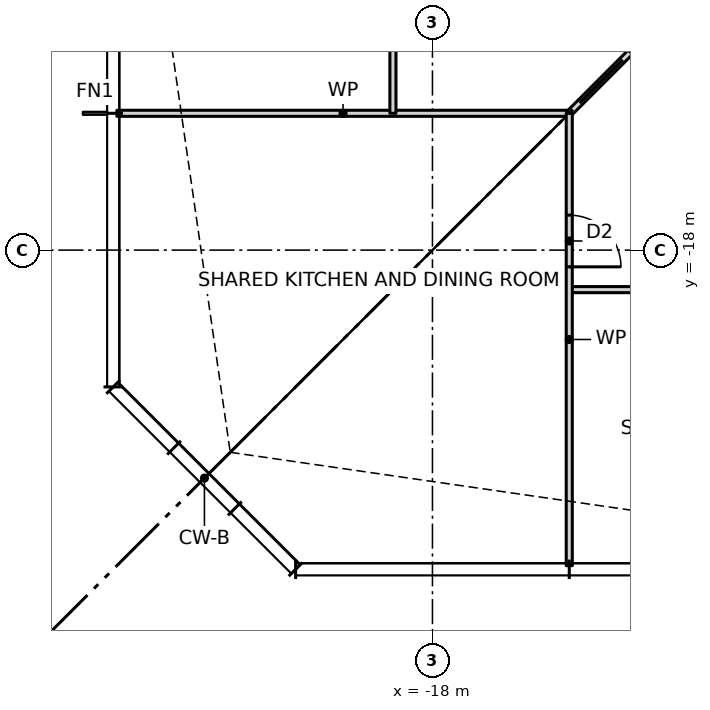
"""IFC4 building model, lengths in metres.
Left out: names, types, materials, properties, quantities, classifications, styles, units other than length and angle.
Written with IfcOpenShell. Run it as: python <this file> out.ifc"""

import sys

from ifc_helpers import new_model, si_unit, direction, frame, frame_2d, origin, place, context, subcontext, project, spatial, rectangle, extrude, element, fill, save


model = new_model("IFC4")
c1 = context("Model", 3, precision=1e-05, world=origin(), true_north=direction((0.0, 1.0)))
c2 = subcontext(c1, "Body", "Model", "MODEL_VIEW")
j1 = project(units=[si_unit("LENGTHUNIT", "METRE"), si_unit("PLANEANGLEUNIT", "RADIAN")], contexts=[c1])
p1 = place(None, origin())
s1 = spatial("IfcSite", under=j1, at=p1, CompositionType="ELEMENT")
p2 = place(p1, origin())
s2 = spatial("IfcBuilding", under=s1, at=p2, CompositionType="ELEMENT")
p3 = place(p2, frame((0.0, 0.0, 71.0)))
s3 = spatial("IfcBuildingStorey", under=s2, at=p3, CompositionType="ELEMENT", Elevation=71.0)
p4 = place(p3, frame((-15.75, -18.65, 0.0), z_axis=(0.0, 0.0, 1.0), x_axis=(1.0, 0.0, 0.0)))
e1 = element("IfcWall", 1, at=p4, inside=s3, PredefinedType="PARTITIONING", context=c2, shape_type="SweptSolid", body=[
    extrude(rectangle(XDim=31.5, YDim=0.1, at=frame_2d((15.75, 0.0))), origin(), (0.0, 0.0, 1.0), 3.2),
])
p5 = place(p4, frame((1.8, 0.0, 0.0)))
e2 = element("IfcOpeningElement", 2, at=p5, cuts=e1, PredefinedType="OPENING", context=c2, shape_type="SweptSolid", body=[
    extrude(rectangle(XDim=0.9, YDim=2.1, at=frame_2d((0.45, 1.05))), frame((0.0, 0.06, 0.0), z_axis=(0.0, -1.0, 0.0), x_axis=(1.0, 0.0, 0.0)), (0.0, 0.0, 1.0), 0.12),
])
p6 = place(p4, frame((6.3, 0.0, 0.0)))
e3 = element("IfcOpeningElement", 3, at=p6, cuts=e1, PredefinedType="OPENING", context=c2, shape_type="SweptSolid", body=[
    extrude(rectangle(XDim=0.9, YDim=2.1, at=frame_2d((0.45, 1.05))), frame((0.0, 0.06, 0.0), z_axis=(0.0, -1.0, 0.0), x_axis=(1.0, 0.0, 0.0)), (0.0, 0.0, 1.0), 0.12),
])
p7 = place(p4, frame((10.8, 0.0, 0.0)))
e4 = element("IfcOpeningElement", 4, at=p7, cuts=e1, PredefinedType="OPENING", context=c2, shape_type="SweptSolid", body=[
    extrude(rectangle(XDim=0.9, YDim=2.1, at=frame_2d((0.45, 1.05))), frame((0.0, 0.06, 0.0), z_axis=(0.0, -1.0, 0.0), x_axis=(1.0, 0.0, 0.0)), (0.0, 0.0, 1.0), 0.12),
])
p8 = place(p4, frame((15.3, 0.0, 0.0)))
e5 = element("IfcOpeningElement", 5, at=p8, cuts=e1, PredefinedType="OPENING", context=c2, shape_type="SweptSolid", body=[
    extrude(rectangle(XDim=0.9, YDim=2.1, at=frame_2d((0.45, 1.05))), frame((0.0, 0.06, 0.0), z_axis=(0.0, -1.0, 0.0), x_axis=(1.0, 0.0, 0.0)), (0.0, 0.0, 1.0), 0.12),
])
p9 = place(p4, frame((19.8, 0.0, 0.0)))
e6 = element("IfcOpeningElement", 6, at=p9, cuts=e1, PredefinedType="OPENING", context=c2, shape_type="SweptSolid", body=[
    extrude(rectangle(XDim=0.9, YDim=2.1, at=frame_2d((0.45, 1.05))), frame((0.0, 0.06, 0.0), z_axis=(0.0, -1.0, 0.0), x_axis=(1.0, 0.0, 0.0)), (0.0, 0.0, 1.0), 0.12),
])
p10 = place(p4, frame((24.3, 0.0, 0.0)))
e7 = element("IfcOpeningElement", 7, at=p10, cuts=e1, PredefinedType="OPENING", context=c2, shape_type="SweptSolid", body=[
    extrude(rectangle(XDim=0.9, YDim=2.1, at=frame_2d((0.45, 1.05))), frame((0.0, 0.06, 0.0), z_axis=(0.0, -1.0, 0.0), x_axis=(1.0, 0.0, 0.0)), (0.0, 0.0, 1.0), 0.12),
])
p11 = place(p4, frame((28.8, 0.0, 0.0)))
e8 = element("IfcOpeningElement", 8, at=p11, cuts=e1, PredefinedType="OPENING", context=c2, shape_type="SweptSolid", body=[
    extrude(rectangle(XDim=0.9, YDim=2.1, at=frame_2d((0.45, 1.05))), frame((0.0, 0.06, 0.0), z_axis=(0.0, -1.0, 0.0), x_axis=(1.0, 0.0, 0.0)), (0.0, 0.0, 1.0), 0.12),
])
p12 = place(p3, frame((-23.19, -15.75, 0.0), z_axis=(0.0, 0.0, 1.0), x_axis=(1.0, 0.0, 0.0)))
e9 = element("IfcWall", 9, at=p12, inside=s3, PredefinedType="PARTITIONING", context=c2, shape_type="SweptSolid", body=[
    extrude(rectangle(XDim=7.44, YDim=0.1, at=frame_2d((3.72, 0.0))), origin(), (0.0, 0.0, 1.0), 3.2),
])
p13 = place(p3, frame((-15.75, -15.75, 0.0), z_axis=(0.0, 0.0, 1.0), x_axis=(0.707106781187, 0.707106781187, 0.0)))
e10 = element("IfcWall", 10, at=p13, inside=s3, PredefinedType="PARTITIONING", context=c2, shape_type="SweptSolid", body=[
    extrude(rectangle(XDim=5.869, YDim=0.1, at=frame_2d((2.935, 0.0))), origin(), (0.0, 0.0, 1.0), 3.2),
])
p14 = place(p3, frame((-15.75, -23.19, 0.0), z_axis=(0.0, 0.0, 1.0), x_axis=(0.0, 1.0, 0.0)))
e11 = element("IfcWall", 11, at=p14, inside=s3, PredefinedType="PARTITIONING", context=c2, shape_type="SweptSolid", body=[
    extrude(rectangle(XDim=7.44, YDim=0.1, at=frame_2d((3.72, 0.0))), origin(), (0.0, 0.0, 1.0), 3.2),
])
p15 = place(p14, frame((4.915, 0.0, 0.0)))
e12 = element("IfcOpeningElement", 12, at=p15, cuts=e11, PredefinedType="OPENING", context=c2, shape_type="SweptSolid", body=[
    extrude(rectangle(XDim=0.85, YDim=2.1, at=frame_2d((0.425, 1.05))), frame((0.0, 0.06, 0.0), z_axis=(0.0, -1.0, 0.0), x_axis=(1.0, 0.0, 0.0)), (0.0, 0.0, 1.0), 0.12),
])
p16 = place(p3, frame((-18.65, -15.75, 0.0), z_axis=(0.0, 0.0, 1.0), x_axis=(0.0, 1.0, 0.0)))
e13 = element("IfcWall", 13, at=p16, inside=s3, PredefinedType="PARTITIONING", context=c2, shape_type="SweptSolid", body=[
    extrude(rectangle(XDim=27.0, YDim=0.1, at=frame_2d((13.5, 0.0))), origin(), (0.0, 0.0, 1.0), 3.0),
])
p17 = place(p16, frame((24.3, 0.0, 0.0)))
e14 = element("IfcOpeningElement", 14, at=p17, cuts=e13, PredefinedType="OPENING", context=c2, shape_type="SweptSolid", body=[
    extrude(rectangle(XDim=0.9, YDim=2.1, at=frame_2d((0.45, 1.05))), frame((0.0, 0.06, 0.0), z_axis=(0.0, -1.0, 0.0), x_axis=(1.0, 0.0, 0.0)), (0.0, 0.0, 1.0), 0.12),
])
p18 = place(p16, frame((19.8, 0.0, 0.0)))
e15 = element("IfcOpeningElement", 15, at=p18, cuts=e13, PredefinedType="OPENING", context=c2, shape_type="SweptSolid", body=[
    extrude(rectangle(XDim=0.9, YDim=2.1, at=frame_2d((0.45, 1.05))), frame((0.0, 0.06, 0.0), z_axis=(0.0, -1.0, 0.0), x_axis=(1.0, 0.0, 0.0)), (0.0, 0.0, 1.0), 0.12),
])
p19 = place(p16, frame((15.3, 0.0, 0.0)))
e16 = element("IfcOpeningElement", 16, at=p19, cuts=e13, PredefinedType="OPENING", context=c2, shape_type="SweptSolid", body=[
    extrude(rectangle(XDim=0.9, YDim=2.1, at=frame_2d((0.45, 1.05))), frame((0.0, 0.06, 0.0), z_axis=(0.0, -1.0, 0.0), x_axis=(1.0, 0.0, 0.0)), (0.0, 0.0, 1.0), 0.12),
])
p20 = place(p16, frame((10.8, 0.0, 0.0)))
e17 = element("IfcOpeningElement", 17, at=p20, cuts=e13, PredefinedType="OPENING", context=c2, shape_type="SweptSolid", body=[
    extrude(rectangle(XDim=0.9, YDim=2.1, at=frame_2d((0.45, 1.05))), frame((0.0, 0.06, 0.0), z_axis=(0.0, -1.0, 0.0), x_axis=(1.0, 0.0, 0.0)), (0.0, 0.0, 1.0), 0.12),
])
p21 = place(p16, frame((6.3, 0.0, 0.0)))
e18 = element("IfcOpeningElement", 18, at=p21, cuts=e13, PredefinedType="OPENING", context=c2, shape_type="SweptSolid", body=[
    extrude(rectangle(XDim=0.9, YDim=2.1, at=frame_2d((0.45, 1.05))), frame((0.0, 0.06, 0.0), z_axis=(0.0, -1.0, 0.0), x_axis=(1.0, 0.0, 0.0)), (0.0, 0.0, 1.0), 0.12),
])
p22 = place(p16, frame((1.8, 0.0, 0.0)))
e19 = element("IfcOpeningElement", 19, at=p22, cuts=e13, PredefinedType="OPENING", context=c2, shape_type="SweptSolid", body=[
    extrude(rectangle(XDim=0.9, YDim=2.1, at=frame_2d((0.45, 1.05))), frame((0.0, 0.06, 0.0), z_axis=(0.0, -1.0, 0.0), x_axis=(1.0, 0.0, 0.0)), (0.0, 0.0, 1.0), 0.12),
])
p23 = place(p15, frame((0.85, 0.0, 0.0), z_axis=(0.0, 0.0, 1.0), x_axis=(-1.0, 0.0, 0.0)))
e20 = element("IfcDoor", 20, at=p23, inside=s3, OperationType="SINGLE_SWING_RIGHT", PredefinedType="DOOR", context=c2, shape_type="SweptSolid", body=[
    extrude(rectangle(XDim=0.85, YDim=2.1, at=frame_2d((0.425, 1.05))), frame((0.0, 0.025, 0.0), z_axis=(0.0, -1.0, 0.0), x_axis=(1.0, 0.0, 0.0)), (0.0, 0.0, 1.0), 0.05),
])
fill(e12, e20)
save(model, sys.argv[1])
